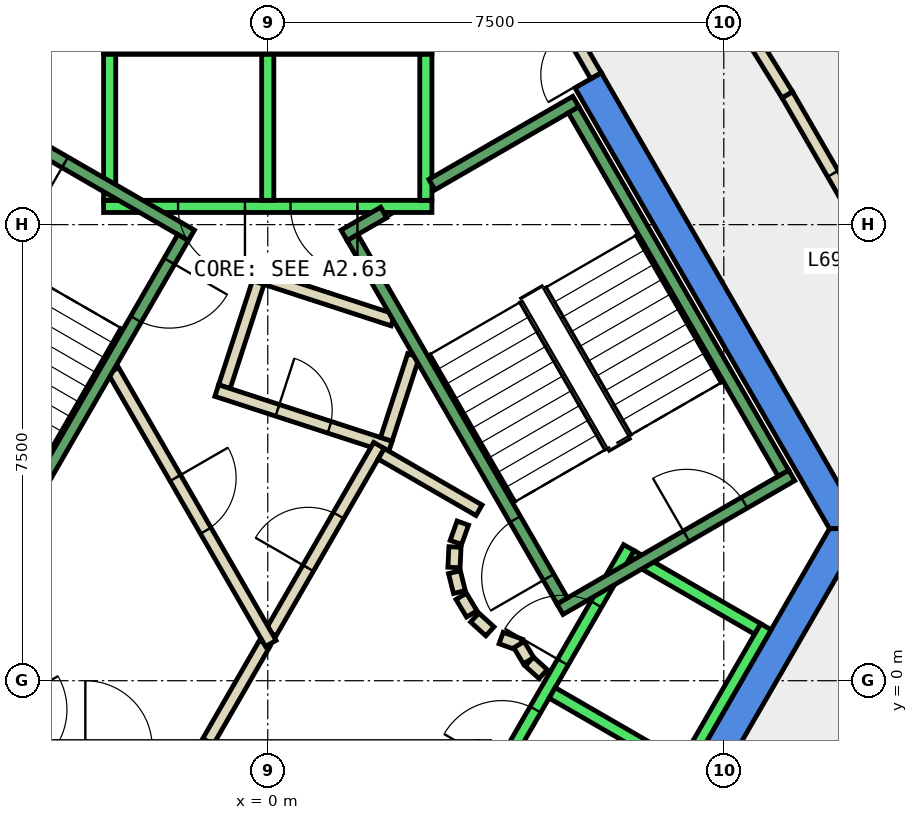
"""IFC4 building model, lengths in metres.
Left out: names, types, materials, properties, quantities, classifications, styles, units other than length and angle.
Written with IfcOpenShell. Run it as: python <this file> out.ifc"""

import sys

from ifc_helpers import new_model, si_unit, direction, frame, frame_2d, origin, place, context, subcontext, project, spatial, polyline, rectangle, outline, extrude, element, fill, save


model = new_model("IFC4")
c1 = context("Model", 3, precision=1e-05, world=origin(), true_north=direction((0.0, 1.0)))
c2 = subcontext(c1, "Body", "Model", "MODEL_VIEW")
j1 = project(units=[si_unit("LENGTHUNIT", "METRE"), si_unit("PLANEANGLEUNIT", "RADIAN")], contexts=[c1])
p1 = place(None, origin())
s1 = spatial("IfcSite", under=j1, at=p1, CompositionType="ELEMENT")
p2 = place(p1, origin())
s2 = spatial("IfcBuilding", under=s1, at=p2, CompositionType="ELEMENT")
p3 = place(p2, frame((0.0, 0.0, 297.2)))
s3 = spatial("IfcBuildingStorey", under=s2, at=p3, CompositionType="ELEMENT", Elevation=297.2)
p4 = place(p3, frame((0.0, 0.0, -0.34)))
e1 = element("IfcWall", 1, at=p4, inside=s3, PredefinedType="SHEAR", context=c2, shape_type="SweptSolid", body=[
    extrude(outline(polyline([(5.486, 9.998), (5.053, 9.748), (9.238, 2.5), (9.815, 2.5), (5.486, 9.998)])), origin(), (0.0, 0.0, 1.0), 3.6),
])
p5 = place(p3, frame((0.0, 0.0, -0.34)))
e2 = element("IfcWall", 2, at=p5, inside=s3, PredefinedType="SHEAR", context=c2, shape_type="SweptSolid", body=[
    extrude(outline(polyline([(4.907, -6.0), (9.815, 2.5), (9.238, 2.5), (4.619, -5.5), (4.907, -6.0)])), origin(), (0.0, 0.0, 1.0), 3.6),
])
p6 = place(p3, frame((2.06, 5.931, 0.0), z_axis=(0.0, 0.0, 1.0), x_axis=(-0.95092855133, 0.309410552932, 0.0)))
e3 = element("IfcWall", 3, at=p6, inside=s3, PredefinedType="PARTITIONING", context=c2, shape_type="SweptSolid", body=[
    extrude(rectangle(XDim=2.399, YDim=0.2, at=frame_2d((1.199, 0.0))), origin(), (0.0, 0.0, 1.0), 3.26),
])
p7 = place(p3, frame((-0.157, 6.547, 0.0), z_axis=(0.0, 0.0, 1.0), x_axis=(-0.308813127339, -0.951122732555, 0.0)))
e4 = element("IfcWall", 4, at=p7, inside=s3, PredefinedType="PARTITIONING", context=c2, shape_type="SweptSolid", body=[
    extrude(rectangle(XDim=1.8, YDim=0.2, at=frame_2d((0.9, 0.0))), origin(), (0.0, 0.0, 1.0), 3.26),
])
p8 = place(p3, frame((-0.839, 4.771, 0.0), z_axis=(0.0, 0.0, 1.0), x_axis=(0.950961084355, -0.309310549515, 0.0)))
e5 = element("IfcWall", 5, at=p8, inside=s3, PredefinedType="PARTITIONING", context=c2, shape_type="SweptSolid", body=[
    extrude(rectangle(XDim=3.0, YDim=0.2, at=frame_2d((1.5, 0.0))), origin(), (0.0, 0.0, 1.0), 3.26),
])
p9 = place(p8, frame((1.05, 0.0, 0.0)))
e6 = element("IfcOpeningElement", 6, at=p9, cuts=e5, PredefinedType="OPENING", context=c2, shape_type="SweptSolid", body=[
    extrude(rectangle(XDim=0.9, YDim=2.1, at=frame_2d((0.45, 1.05))), frame((0.0, 0.11, 0.0), z_axis=(0.0, -1.0, 0.0), x_axis=(1.0, 0.0, 0.0)), (0.0, 0.0, 1.0), 0.22),
])
p10 = place(p3, frame((1.95, 3.97, 0.0), z_axis=(0.0, 0.0, 1.0), x_axis=(0.308583003896, 0.951197418892, 0.0)))
e7 = element("IfcWall", 7, at=p10, inside=s3, PredefinedType="PARTITIONING", context=c2, shape_type="SweptSolid", body=[
    extrude(rectangle(XDim=1.449, YDim=0.2, at=frame_2d((0.724, 0.0))), origin(), (0.0, 0.0, 1.0), 3.26),
])
p11 = place(p3, frame((6.683, 12.642, 0.0), z_axis=(0.0, 0.0, 1.0), x_axis=(0.526290465295, -0.850304854825, 0.0)))
e8 = element("IfcWall", 8, at=p11, inside=s3, PredefinedType="PARTITIONING", context=c2, shape_type="SweptSolid", body=[
    extrude(rectangle(XDim=3.538, YDim=0.2, at=frame_2d((1.769, 0.0))), origin(), (0.0, 0.0, 1.0), 3.26),
])
p12 = place(p3, frame((8.545, 9.634, 0.0), z_axis=(0.0, 0.0, 1.0), x_axis=(0.50008212199, -0.86597798544, 0.0)))
e9 = element("IfcWall", 9, at=p12, inside=s3, PredefinedType="PARTITIONING", context=c2, shape_type="SweptSolid", body=[
    extrude(rectangle(XDim=3.995, YDim=0.2, at=frame_2d((1.998, 0.0))), origin(), (0.0, 0.0, 1.0), 3.26),
])
p13 = place(p12, frame((1.498, 0.0, 0.0)))
e10 = element("IfcOpeningElement", 10, at=p13, cuts=e9, PredefinedType="OPENING", context=c2, shape_type="SweptSolid", body=[
    extrude(rectangle(XDim=1.0, YDim=2.1, at=frame_2d((0.5, 1.05))), frame((0.0, 0.11, 0.0), z_axis=(0.0, -1.0, 0.0), x_axis=(1.0, 0.0, 0.0)), (0.0, 0.0, 1.0), 0.22),
])
p14 = place(p3, frame((-0.982, -1.0, 0.0), z_axis=(0.0, 0.0, 1.0), x_axis=(0.50024047865, 0.865886518847, 0.0)))
e11 = element("IfcWall", 11, at=p14, inside=s3, PredefinedType="PARTITIONING", context=c2, shape_type="SweptSolid", body=[
    extrude(rectangle(XDim=1.863, YDim=0.2, at=frame_2d((0.931, 0.0))), origin(), (0.0, 0.0, 1.0), 3.26),
])
p15 = place(p3, frame((0.05, 0.787, 0.0), z_axis=(0.0, 0.0, 1.0), x_axis=(0.499954076797, 0.866051915934, 0.0)))
e12 = element("IfcWall", 12, at=p15, inside=s3, PredefinedType="PARTITIONING", context=c2, shape_type="SweptSolid", body=[
    extrude(rectangle(XDim=3.558, YDim=0.2, at=frame_2d((1.779, 0.0))), origin(), (0.0, 0.0, 1.0), 3.26),
])
p16 = place(p15, frame((1.229, 0.0, 0.0)))
e13 = element("IfcOpeningElement", 13, at=p16, cuts=e12, PredefinedType="OPENING", context=c2, shape_type="SweptSolid", body=[
    extrude(rectangle(XDim=1.0, YDim=2.1, at=frame_2d((0.5, 1.05))), frame((0.0, 0.11, 0.0), z_axis=(0.0, -1.0, 0.0), x_axis=(1.0, 0.0, 0.0)), (0.0, 0.0, 1.0), 0.22),
])
p17 = place(p3, frame((1.866, 3.732, 0.0), z_axis=(0.0, 0.0, 1.0), x_axis=(0.866043361281, -0.499968895414, 0.0)))
e14 = element("IfcWall", 14, at=p17, inside=s3, PredefinedType="PARTITIONING", context=c2, shape_type="SweptSolid", body=[
    extrude(rectangle(XDim=1.858, YDim=0.2, at=frame_2d((0.929, 0.0))), origin(), (0.0, 0.0, 1.0), 3.26),
])
p18 = place(p3, frame((3.208, 2.592, 0.0), z_axis=(0.0, 0.0, 1.0), x_axis=(-0.337388820924, -0.941365382578, 0.0)))
e15 = element("IfcWall", 15, at=p18, inside=s3, PredefinedType="PARTITIONING", context=c2, shape_type="SweptSolid", body=[
    extrude(rectangle(XDim=0.338, YDim=0.2, at=frame_2d((0.169, 0.0))), origin(), (0.0, 0.0, 1.0), 3.26),
])
p19 = place(p3, frame((3.079, 2.199, 0.0), z_axis=(0.0, 0.0, 1.0), x_axis=(-0.047771483479, -0.998858290933, 0.0)))
e16 = element("IfcWall", 16, at=p19, inside=s3, PredefinedType="PARTITIONING", context=c2, shape_type="SweptSolid", body=[
    extrude(rectangle(XDim=0.337, YDim=0.2, at=frame_2d((0.169, 0.0))), origin(), (0.0, 0.0, 1.0), 3.26),
])
p20 = place(p3, frame((3.07, 1.786, 0.0), z_axis=(0.0, 0.0, 1.0), x_axis=(0.242705583207, -0.970099994784, 0.0)))
e17 = element("IfcWall", 17, at=p20, inside=s3, PredefinedType="PARTITIONING", context=c2, shape_type="SweptSolid", body=[
    extrude(rectangle(XDim=0.338, YDim=0.2, at=frame_2d((0.169, 0.0))), origin(), (0.0, 0.0, 1.0), 3.26),
])
for number, where, z_axis, x_axis in (
    (18, (3.182, 1.388, 0.0), (0.0, 0.0, 1.0), (0.512, -0.859, 0.0)),
    (19, (3.404, 1.039, 0.0), (0.0, 0.0, 1.0), (0.74, -0.672, 0.0)),
):
    element("IfcWall", number, at=place(p3, frame(where, z_axis=z_axis, x_axis=x_axis)), inside=s3, PredefinedType="PARTITIONING", context=c2, shape_type="SweptSolid", body=[
        extrude(rectangle(XDim=0.338, YDim=0.2, at=frame_2d((0.169, 0.0))), origin(), (0.0, 0.0, 1.0), 3.26),
    ])
p21 = place(p3, frame((3.838, 0.702, 0.0), z_axis=(0.0, 0.0, 1.0), x_axis=(0.941035081519, -0.338308993895, 0.0)))
e20 = element("IfcWall", 20, at=p21, inside=s3, PredefinedType="PARTITIONING", context=c2, shape_type="SweptSolid", body=[
    extrude(rectangle(XDim=0.337, YDim=0.2, at=frame_2d((0.168, 0.0))), origin(), (0.0, 0.0, 1.0), 3.26),
])
p22 = place(p3, frame((4.132, 0.593, 0.0), z_axis=(0.0, 0.0, 1.0), x_axis=(0.513561617048, -0.858052717201, 0.0)))
e21 = element("IfcWall", 21, at=p22, inside=s3, PredefinedType="PARTITIONING", context=c2, shape_type="SweptSolid", body=[
    extrude(rectangle(XDim=0.308, YDim=0.2, at=frame_2d((0.154, 0.0))), origin(), (0.0, 0.0, 1.0), 3.26),
])
p23 = place(p3, frame((4.301, 0.315, 0.0), z_axis=(0.0, 0.0, 1.0), x_axis=(0.741798017506, -0.670623367639, 0.0)))
e22 = element("IfcWall", 22, at=p23, inside=s3, PredefinedType="PARTITIONING", context=c2, shape_type="SweptSolid", body=[
    extrude(rectangle(XDim=0.309, YDim=0.2, at=frame_2d((0.154, 0.0))), origin(), (0.0, 0.0, 1.0), 3.26),
])
p24 = place(p3, frame((-2.54, 5.1, 0.0), z_axis=(0.0, 0.0, 1.0), x_axis=(0.499925051871, -0.866068670783, 0.0)))
e23 = element("IfcWall", 23, at=p24, inside=s3, PredefinedType="PARTITIONING", context=c2, shape_type="SweptSolid", body=[
    extrude(rectangle(XDim=5.181, YDim=0.2, at=frame_2d((2.59, 0.0))), origin(), (0.0, 0.0, 1.0), 3.26),
])
p25 = place(p24, frame((2.04, 0.0, 0.0)))
e24 = element("IfcOpeningElement", 24, at=p25, cuts=e23, PredefinedType="OPENING", context=c2, shape_type="SweptSolid", body=[
    extrude(rectangle(XDim=1.0, YDim=2.1, at=frame_2d((0.5, 1.05))), frame((0.0, 0.11, 0.0), z_axis=(0.0, -1.0, 0.0), x_axis=(1.0, 0.0, 0.0)), (0.0, 0.0, 1.0), 0.22),
])
p26 = place(p3, frame((5.399, 9.948, 0.0), z_axis=(0.0, 0.0, 1.0), x_axis=(-0.499882215713, 0.866093395895, 0.0)))
e25 = element("IfcWall", 25, at=p26, inside=s3, PredefinedType="PARTITIONING", context=c2, shape_type="SweptSolid", body=[
    extrude(rectangle(XDim=0.926, YDim=0.2, at=frame_2d((0.463, 0.0))), origin(), (0.0, 0.0, 1.0), 2.4),
])
p27 = place(p26, frame((0.017, 0.0, 0.0)))
e26 = element("IfcOpeningElement", 26, at=p27, cuts=e25, PredefinedType="OPENING", context=c2, shape_type="SweptSolid", body=[
    extrude(rectangle(XDim=0.9, YDim=2.1, at=frame_2d((0.45, 1.05))), frame((0.0, 0.11, 0.0), z_axis=(0.0, -1.0, 0.0), x_axis=(1.0, 0.0, 0.0)), (0.0, 0.0, 1.0), 0.22),
])
p28 = place(p3, frame((2.7, 7.8, 0.0), z_axis=(0.0, 0.0, 1.0), x_axis=(-1.0, 0.0, 0.0)))
e27 = element("IfcWall", 27, at=p28, inside=s3, PredefinedType="STANDARD", context=c2, shape_type="SweptSolid", body=[
    extrude(rectangle(XDim=5.4, YDim=0.2, at=frame_2d((2.7, 0.0))), origin(), (0.0, 0.0, 1.0), 3.26),
])
p29 = place(p28, frame((1.225, 0.0, 0.0)))
e28 = element("IfcOpeningElement", 28, at=p29, cuts=e27, PredefinedType="OPENING", context=c2, shape_type="SweptSolid", body=[
    extrude(rectangle(XDim=1.1, YDim=2.1, at=frame_2d((0.55, 1.05))), frame((0.0, 0.11, 0.0), z_axis=(0.0, -1.0, 0.0), x_axis=(1.0, 0.0, 0.0)), (0.0, 0.0, 1.0), 0.22),
])
p30 = place(p28, frame((3.075, 0.0, 0.0)))
e29 = element("IfcOpeningElement", 29, at=p30, cuts=e27, PredefinedType="OPENING", context=c2, shape_type="SweptSolid", body=[
    extrude(rectangle(XDim=1.1, YDim=2.1, at=frame_2d((0.55, 1.05))), frame((0.0, 0.11, 0.0), z_axis=(0.0, -1.0, 0.0), x_axis=(1.0, 0.0, 0.0)), (0.0, 0.0, 1.0), 0.22),
])
p31 = place(p3, frame((2.7, 10.4, 0.0), z_axis=(0.0, 0.0, 1.0), x_axis=(-1.0, 0.0, 0.0)))
e30 = element("IfcWall", 30, at=p31, inside=s3, PredefinedType="STANDARD", context=c2, shape_type="SweptSolid", body=[
    extrude(rectangle(XDim=5.4, YDim=0.2, at=frame_2d((2.7, 0.0))), origin(), (0.0, 0.0, 1.0), 3.26),
])
for number, where, z_axis, x_axis in (
    (31, (2.6, 7.9, 0.0), (0.0, 0.0, 1.0), (0.0, 1.0, 0.0)),
    (32, (0.0, 7.9, 0.0), (0.0, 0.0, 1.0), (0.0, 1.0, 0.0)),
    (33, (-2.6, 7.9, 0.0), (0.0, 0.0, 1.0), (0.0, 1.0, 0.0)),
):
    element("IfcWall", number, at=place(p3, frame(where, z_axis=z_axis, x_axis=x_axis)), inside=s3, PredefinedType="STANDARD", context=c2, shape_type="SweptSolid", body=[
        extrude(rectangle(XDim=2.4, YDim=0.2, at=frame_2d((1.2, 0.0))), origin(), (0.0, 0.0, 1.0), 3.26),
    ])
p32 = place(p3, frame((-5.94, 2.188, 0.0), z_axis=(0.0, 0.0, 1.0), x_axis=(0.500034260056, -0.866005622828, 0.0)))
e34 = element("IfcWall", 34, at=p32, inside=s3, PredefinedType="STANDARD", context=c2, shape_type="SweptSolid", body=[
    extrude(rectangle(XDim=5.399, YDim=0.2, at=frame_2d((2.7, 0.0))), origin(), (0.0, 0.0, 1.0), 3.26),
])
p33 = place(p32, frame((3.075, 0.0, 0.0)))
e35 = element("IfcOpeningElement", 35, at=p33, cuts=e34, PredefinedType="OPENING", context=c2, shape_type="SweptSolid", body=[
    extrude(rectangle(XDim=1.1, YDim=2.1, at=frame_2d((0.55, 1.05))), frame((0.0, 0.11, 0.0), z_axis=(0.0, -1.0, 0.0), x_axis=(1.0, 0.0, 0.0)), (0.0, 0.0, 1.0), 0.22),
])
p34 = place(p32, frame((1.225, 0.0, 0.0)))
e36 = element("IfcOpeningElement", 36, at=p34, cuts=e34, PredefinedType="OPENING", context=c2, shape_type="SweptSolid", body=[
    extrude(rectangle(XDim=1.1, YDim=2.1, at=frame_2d((0.55, 1.05))), frame((0.0, 0.11, 0.0), z_axis=(0.0, -1.0, 0.0), x_axis=(1.0, 0.0, 0.0)), (0.0, 0.0, 1.0), 0.22),
])
p35 = place(p3, frame((3.24, -2.488, 0.0), z_axis=(0.0, 0.0, 1.0), x_axis=(0.500034260056, 0.866005622828, 0.0)))
e37 = element("IfcWall", 37, at=p35, inside=s3, PredefinedType="STANDARD", context=c2, shape_type="SweptSolid", body=[
    extrude(rectangle(XDim=5.399, YDim=0.2, at=frame_2d((2.7, 0.0))), origin(), (0.0, 0.0, 1.0), 3.26),
])
p36 = place(p35, frame((3.225, 0.0, 0.0)))
e38 = element("IfcOpeningElement", 38, at=p36, cuts=e37, PredefinedType="OPENING", context=c2, shape_type="SweptSolid", body=[
    extrude(rectangle(XDim=1.1, YDim=2.1, at=frame_2d((0.55, 1.05))), frame((0.0, 0.11, 0.0), z_axis=(0.0, -1.0, 0.0), x_axis=(1.0, 0.0, 0.0)), (0.0, 0.0, 1.0), 0.22),
])
p37 = place(p35, frame((1.225, 0.0, 0.0)))
e39 = element("IfcOpeningElement", 39, at=p37, cuts=e37, PredefinedType="OPENING", context=c2, shape_type="SweptSolid", body=[
    extrude(rectangle(XDim=1.1, YDim=2.1, at=frame_2d((0.55, 1.05))), frame((0.0, 0.11, 0.0), z_axis=(0.0, -1.0, 0.0), x_axis=(1.0, 0.0, 0.0)), (0.0, 0.0, 1.0), 0.22),
])
p38 = place(p3, frame((5.492, -3.788, 0.0), z_axis=(0.0, 0.0, 1.0), x_axis=(0.500034260056, 0.866005622828, 0.0)))
e40 = element("IfcWall", 40, at=p38, inside=s3, PredefinedType="STANDARD", context=c2, shape_type="SweptSolid", body=[
    extrude(rectangle(XDim=5.399, YDim=0.2, at=frame_2d((2.7, 0.0))), origin(), (0.0, 0.0, 1.0), 3.26),
])
for number, where, z_axis, x_axis in (
    (41, (4.677, -0.2, 0.0), (0.0, 0.0, 1.0), (0.866, -0.5, 0.0)),
    (42, (5.977, 2.052, 0.0), (0.0, 0.0, 1.0), (0.866, -0.5, 0.0)),
):
    element("IfcWall", number, at=place(p3, frame(where, z_axis=z_axis, x_axis=x_axis)), inside=s3, PredefinedType="STANDARD", context=c2, shape_type="SweptSolid", body=[
        extrude(rectangle(XDim=2.399, YDim=0.2, at=frame_2d((1.2, 0.0))), origin(), (0.0, 0.0, 1.0), 3.26),
    ])
p39 = place(p3, frame((4.806, 1.176, 0.0), z_axis=(0.0, 0.0, 1.0), x_axis=(0.866059941101, 0.499940174841, 0.0)))
e43 = element("IfcWall", 43, at=p39, inside=s3, PredefinedType="STANDARD", context=c2, shape_type="SweptSolid", body=[
    extrude(rectangle(XDim=4.4, YDim=0.2, at=frame_2d((2.2, 0.0))), origin(), (0.0, 0.0, 1.0), 3.26),
])
p40 = place(p39, frame((2.4, 0.0, 0.0)))
e44 = element("IfcOpeningElement", 44, at=p40, cuts=e43, PredefinedType="OPENING", context=c2, shape_type="SweptSolid", body=[
    extrude(rectangle(XDim=1.1, YDim=2.2, at=frame_2d((0.55, 1.1))), frame((0.0, 0.11, 0.0), z_axis=(0.0, -1.0, 0.0), x_axis=(1.0, 0.0, 0.0)), (0.0, 0.0, 1.0), 0.22),
])
p41 = place(p3, frame((2.7, 8.158, 0.0), z_axis=(0.0, 0.0, 1.0), x_axis=(0.86611865017, 0.499838457731, 0.0)))
e45 = element("IfcWall", 45, at=p41, inside=s3, PredefinedType="STANDARD", context=c2, shape_type="SweptSolid", body=[
    extrude(rectangle(XDim=2.733, YDim=0.2, at=frame_2d((1.366, 0.0))), origin(), (0.0, 0.0, 1.0), 3.26),
])
p42 = place(p3, frame((1.256, 7.324, 0.0), z_axis=(0.0, 0.0, 1.0), x_axis=(0.865915093549, 0.500191014278, 0.0)))
e46 = element("IfcWall", 46, at=p42, inside=s3, PredefinedType="STANDARD", context=c2, shape_type="SweptSolid", body=[
    extrude(rectangle(XDim=0.752, YDim=0.2, at=frame_2d((0.376, 0.0))), origin(), (0.0, 0.0, 1.0), 3.26),
])
p43 = place(p3, frame((4.843, 1.312, 0.0), z_axis=(0.0, 0.0, 1.0), x_axis=(-0.499963383562, 0.866046543262, 0.0)))
e47 = element("IfcWall", 47, at=p43, inside=s3, PredefinedType="STANDARD", context=c2, shape_type="SweptSolid", body=[
    extrude(rectangle(XDim=6.9, YDim=0.2, at=frame_2d((3.45, 0.0))), origin(), (0.0, 0.0, 1.0), 3.26),
])
p44 = place(p43, frame((0.45, 0.0, 0.0)))
e48 = element("IfcOpeningElement", 48, at=p44, cuts=e47, PredefinedType="OPENING", context=c2, shape_type="SweptSolid", body=[
    extrude(rectangle(XDim=1.1, YDim=2.2, at=frame_2d((0.55, 1.1))), frame((0.0, 0.11, 0.0), z_axis=(0.0, -1.0, 0.0), x_axis=(1.0, 0.0, 0.0)), (0.0, 0.0, 1.0), 0.22),
])
p45 = place(p3, frame((8.48, 3.412, 0.0), z_axis=(0.0, 0.0, 1.0), x_axis=(-0.499978703459, 0.866037698999, 0.0)))
e49 = element("IfcWall", 49, at=p45, inside=s3, PredefinedType="STANDARD", context=c2, shape_type="SweptSolid", body=[
    extrude(rectangle(XDim=6.9, YDim=0.2, at=frame_2d((3.45, 0.0))), origin(), (0.0, 0.0, 1.0), 3.26),
])
p46 = place(p3, frame((-1.256, 7.324, 0.0), z_axis=(0.0, 0.0, 1.0), x_axis=(-0.866046073146, 0.499964197906, 0.0)))
e50 = element("IfcWall", 50, at=p46, inside=s3, PredefinedType="STANDARD", context=c2, shape_type="SweptSolid", body=[
    extrude(rectangle(XDim=4.4, YDim=0.2, at=frame_2d((2.2, 0.0))), origin(), (0.0, 0.0, 1.0), 3.26),
])
p47 = place(p46, frame((2.4, 0.0, 0.0)))
e51 = element("IfcOpeningElement", 51, at=p47, cuts=e50, PredefinedType="OPENING", context=c2, shape_type="SweptSolid", body=[
    extrude(rectangle(XDim=1.1, YDim=2.2, at=frame_2d((0.55, 1.1))), frame((0.0, 0.11, 0.0), z_axis=(0.0, -1.0, 0.0), x_axis=(1.0, 0.0, 0.0)), (0.0, 0.0, 1.0), 0.22),
])
p48 = place(p3, frame((-1.393, 7.288, 0.0), z_axis=(0.0, 0.0, 1.0), x_axis=(-0.499963383562, -0.866046543262, 0.0)))
e52 = element("IfcWall", 52, at=p48, inside=s3, PredefinedType="STANDARD", context=c2, shape_type="SweptSolid", body=[
    extrude(rectangle(XDim=6.9, YDim=0.2, at=frame_2d((3.45, 0.0))), origin(), (0.0, 0.0, 1.0), 3.26),
])
p49 = place(p48, frame((0.45, 0.0, 0.0)))
e53 = element("IfcOpeningElement", 53, at=p49, cuts=e52, PredefinedType="OPENING", context=c2, shape_type="SweptSolid", body=[
    extrude(rectangle(XDim=1.1, YDim=2.2, at=frame_2d((0.55, 1.1))), frame((0.0, 0.11, 0.0), z_axis=(0.0, -1.0, 0.0), x_axis=(1.0, 0.0, 0.0)), (0.0, 0.0, 1.0), 0.22),
])
p50 = place(p13, origin())
e54 = element("IfcDoor", 54, at=p50, inside=s3, OperationType="SINGLE_SWING_LEFT", PredefinedType="DOOR", context=c2, shape_type="SweptSolid", body=[
    extrude(rectangle(XDim=1.0, YDim=2.1, at=frame_2d((0.5, 1.05))), frame((0.0, 0.025, 0.0), z_axis=(0.0, -1.0, 0.0), x_axis=(1.0, 0.0, 0.0)), (0.0, 0.0, 1.0), 0.05),
])
fill(e10, e54)
p51 = place(p16, origin())
e55 = element("IfcDoor", 55, at=p51, inside=s3, OperationType="SINGLE_SWING_RIGHT", PredefinedType="DOOR", context=c2, shape_type="SweptSolid", body=[
    extrude(rectangle(XDim=1.0, YDim=2.1, at=frame_2d((0.5, 1.05))), frame((0.0, 0.025, 0.0), z_axis=(0.0, -1.0, 0.0), x_axis=(1.0, 0.0, 0.0)), (0.0, 0.0, 1.0), 0.05),
])
fill(e13, e55)
p52 = place(p25, origin())
e56 = element("IfcDoor", 56, at=p52, inside=s3, OperationType="SINGLE_SWING_RIGHT", PredefinedType="DOOR", context=c2, shape_type="SweptSolid", body=[
    extrude(rectangle(XDim=1.0, YDim=2.1, at=frame_2d((0.5, 1.05))), frame((0.0, 0.025, 0.0), z_axis=(0.0, -1.0, 0.0), x_axis=(1.0, 0.0, 0.0)), (0.0, 0.0, 1.0), 0.05),
])
fill(e24, e56)
p53 = place(p9, origin())
e57 = element("IfcDoor", 57, at=p53, inside=s3, OperationType="SINGLE_SWING_LEFT", PredefinedType="DOOR", context=c2, shape_type="SweptSolid", body=[
    extrude(rectangle(XDim=0.9, YDim=2.1, at=frame_2d((0.45, 1.05))), frame((0.0, 0.025, 0.0), z_axis=(0.0, -1.0, 0.0), x_axis=(1.0, 0.0, 0.0)), (0.0, 0.0, 1.0), 0.05),
])
fill(e6, e57)
p54 = place(p27, origin())
e58 = element("IfcDoor", 58, at=p54, inside=s3, OperationType="SINGLE_SWING_LEFT", PredefinedType="DOOR", context=c2, shape_type="SweptSolid", body=[
    extrude(rectangle(XDim=0.9, YDim=2.1, at=frame_2d((0.45, 1.05))), frame((0.0, 0.025, 0.0), z_axis=(0.0, -1.0, 0.0), x_axis=(1.0, 0.0, 0.0)), (0.0, 0.0, 1.0), 0.05),
])
fill(e26, e58)
p55 = place(p29, origin())
e59 = element("IfcDoor", 59, at=p55, inside=s3, OperationType="SLIDING_TO_LEFT", PredefinedType="DOOR", context=c2, shape_type="SweptSolid", body=[
    extrude(rectangle(XDim=1.1, YDim=2.1, at=frame_2d((0.55, 1.05))), frame((0.0, 0.025, 0.0), z_axis=(0.0, -1.0, 0.0), x_axis=(1.0, 0.0, 0.0)), (0.0, 0.0, 1.0), 0.05),
])
fill(e28, e59)
p56 = place(p30, origin())
e60 = element("IfcDoor", 60, at=p56, inside=s3, OperationType="SLIDING_TO_LEFT", PredefinedType="DOOR", context=c2, shape_type="SweptSolid", body=[
    extrude(rectangle(XDim=1.1, YDim=2.1, at=frame_2d((0.55, 1.05))), frame((0.0, 0.025, 0.0), z_axis=(0.0, -1.0, 0.0), x_axis=(1.0, 0.0, 0.0)), (0.0, 0.0, 1.0), 0.05),
])
fill(e29, e60)
p57 = place(p36, origin())
e61 = element("IfcDoor", 61, at=p57, inside=s3, OperationType="SLIDING_TO_LEFT", PredefinedType="DOOR", context=c2, shape_type="SweptSolid", body=[
    extrude(rectangle(XDim=1.1, YDim=2.1, at=frame_2d((0.55, 1.05))), frame((0.0, 0.025, 0.0), z_axis=(0.0, -1.0, 0.0), x_axis=(1.0, 0.0, 0.0)), (0.0, 0.0, 1.0), 0.05),
])
fill(e38, e61)
p58 = place(p37, origin())
e62 = element("IfcDoor", 62, at=p58, inside=s3, OperationType="SLIDING_TO_LEFT", PredefinedType="DOOR", context=c2, shape_type="SweptSolid", body=[
    extrude(rectangle(XDim=1.1, YDim=2.1, at=frame_2d((0.55, 1.05))), frame((0.0, 0.025, 0.0), z_axis=(0.0, -1.0, 0.0), x_axis=(1.0, 0.0, 0.0)), (0.0, 0.0, 1.0), 0.05),
])
fill(e39, e62)
p59 = place(p44, origin())
e63 = element("IfcDoor", 63, at=p59, inside=s3, OperationType="SINGLE_SWING_LEFT", PredefinedType="DOOR", context=c2, shape_type="SweptSolid", body=[
    extrude(rectangle(XDim=1.1, YDim=2.2, at=frame_2d((0.55, 1.1))), frame((0.0, 0.025, 0.0), z_axis=(0.0, -1.0, 0.0), x_axis=(1.0, 0.0, 0.0)), (0.0, 0.0, 1.0), 0.05),
])
fill(e48, e63)
p60 = place(p40, origin())
e64 = element("IfcDoor", 64, at=p60, inside=s3, OperationType="SINGLE_SWING_LEFT", PredefinedType="DOOR", context=c2, shape_type="SweptSolid", body=[
    extrude(rectangle(XDim=1.1, YDim=2.2, at=frame_2d((0.55, 1.1))), frame((0.0, 0.025, 0.0), z_axis=(0.0, -1.0, 0.0), x_axis=(1.0, 0.0, 0.0)), (0.0, 0.0, 1.0), 0.05),
])
fill(e44, e64)
p61 = place(p49, origin())
e65 = element("IfcDoor", 65, at=p61, inside=s3, OperationType="SINGLE_SWING_LEFT", PredefinedType="DOOR", context=c2, shape_type="SweptSolid", body=[
    extrude(rectangle(XDim=1.1, YDim=2.2, at=frame_2d((0.55, 1.1))), frame((0.0, 0.025, 0.0), z_axis=(0.0, -1.0, 0.0), x_axis=(1.0, 0.0, 0.0)), (0.0, 0.0, 1.0), 0.05),
])
fill(e53, e65)
p62 = place(p47, origin())
e66 = element("IfcDoor", 66, at=p62, inside=s3, OperationType="SINGLE_SWING_LEFT", PredefinedType="DOOR", context=c2, shape_type="SweptSolid", body=[
    extrude(rectangle(XDim=1.1, YDim=2.2, at=frame_2d((0.55, 1.1))), frame((0.0, 0.025, 0.0), z_axis=(0.0, -1.0, 0.0), x_axis=(1.0, 0.0, 0.0)), (0.0, 0.0, 1.0), 0.05),
])
fill(e51, e66)
save(model, sys.argv[1])
